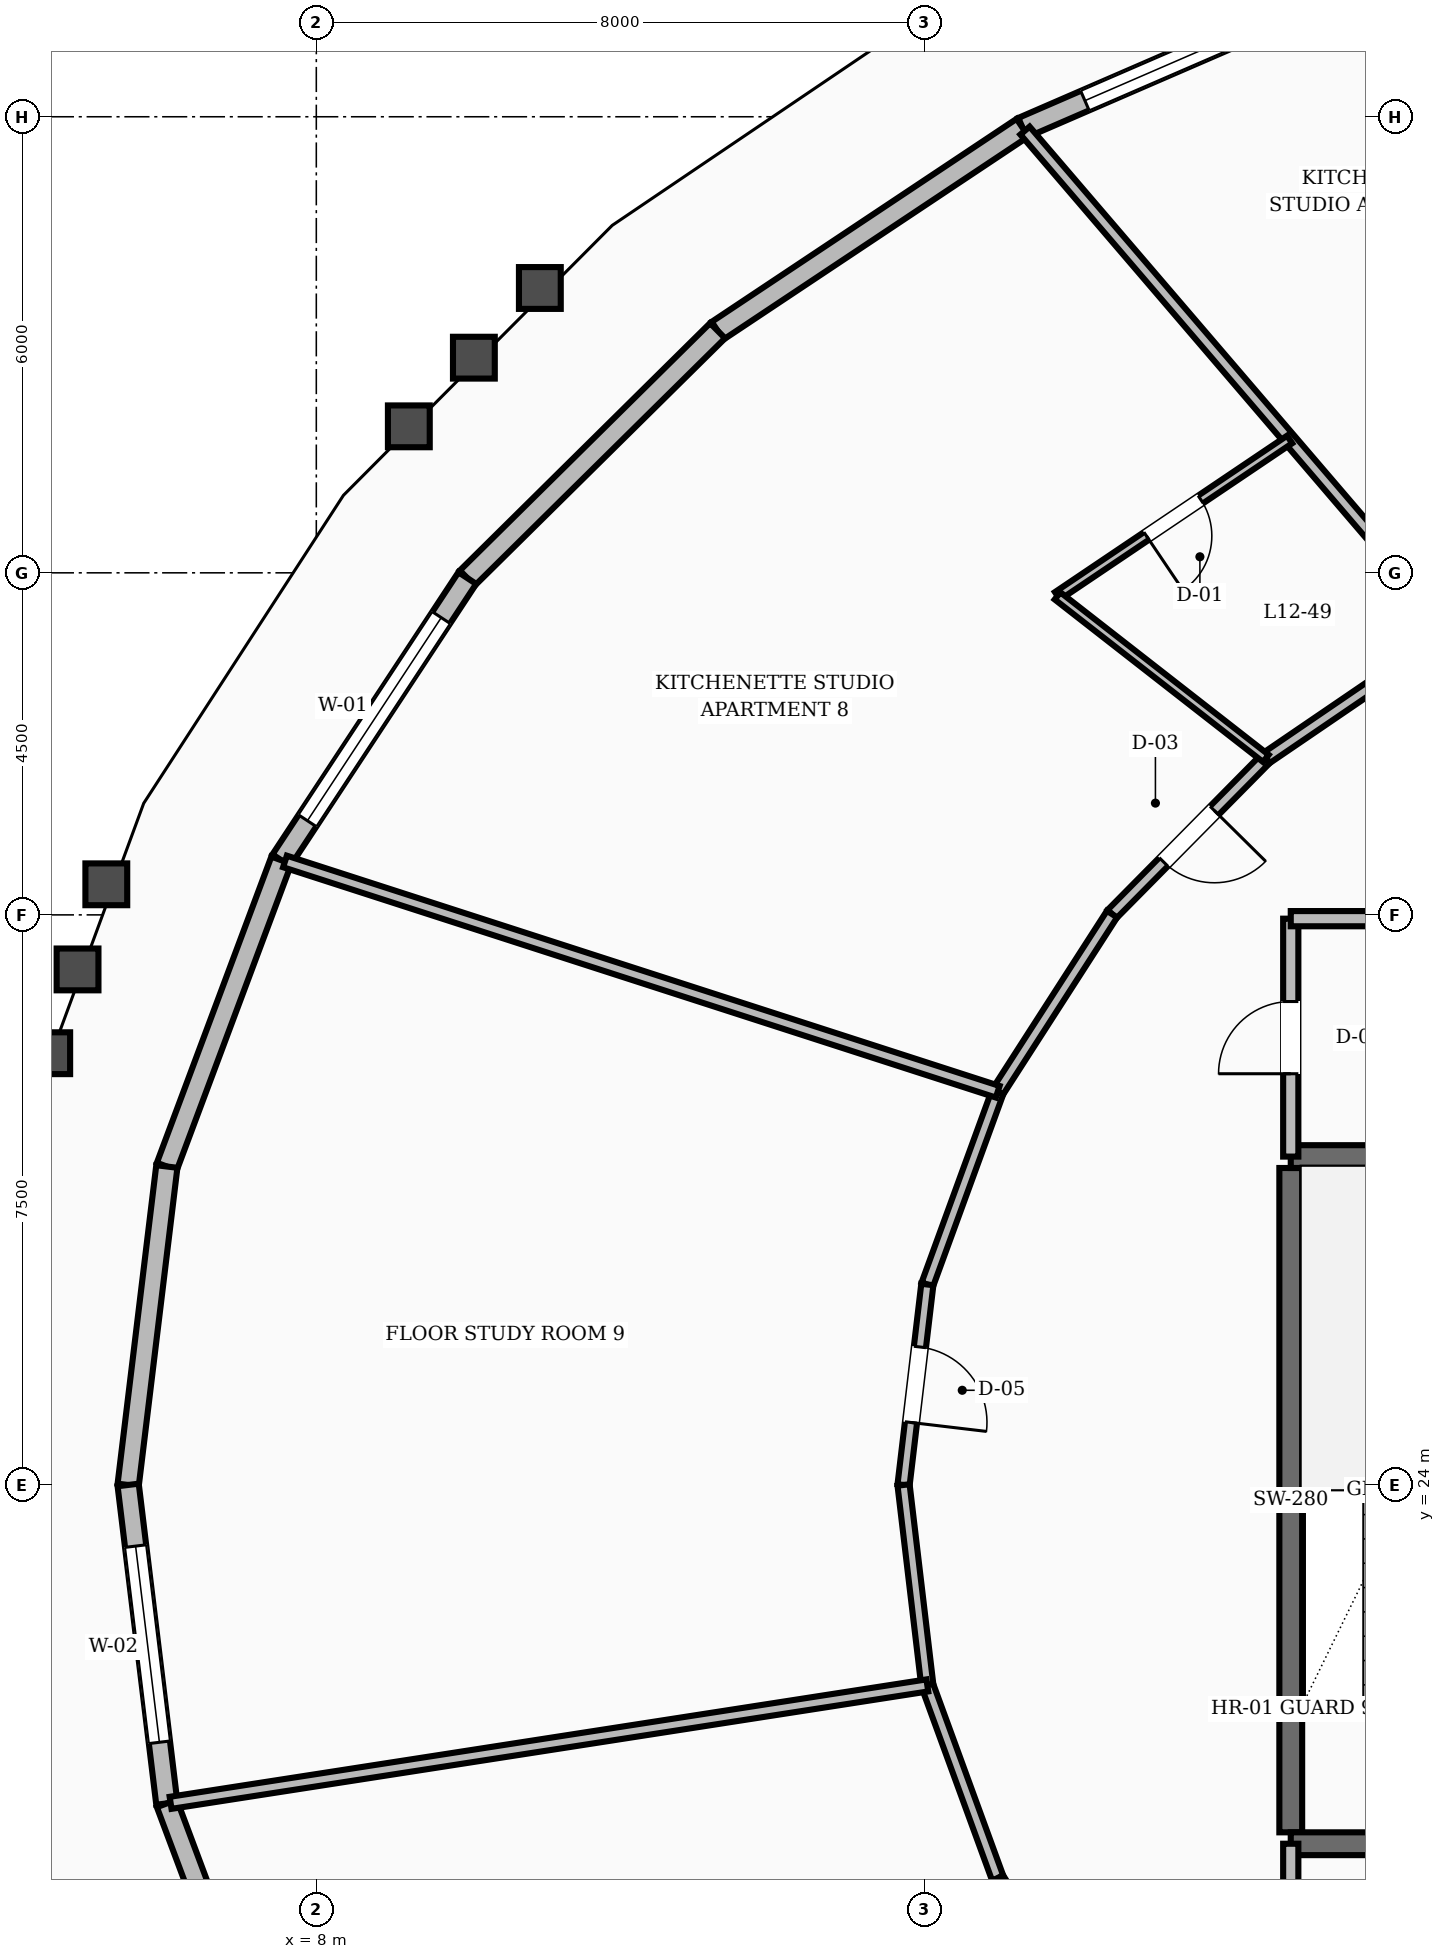
"""IFC4 building model, lengths in metres.
Left out: names, types, materials, properties, quantities, classifications, styles, units other than length and angle.
Written with IfcOpenShell. Run it as: python <this file> out.ifc"""

import sys

from ifc_helpers import new_model, si_unit, direction, frame, frame_2d, origin, place, context, subcontext, project, spatial, rectangle, extrude, element, fill, save


model = new_model("IFC4")
c1 = context("Model", 3, precision=1e-05, world=origin(), true_north=direction((0.0, 1.0)))
c2 = subcontext(c1, "Body", "Model", "MODEL_VIEW")
j1 = project(units=[si_unit("LENGTHUNIT", "METRE"), si_unit("PLANEANGLEUNIT", "RADIAN")], contexts=[c1])
p1 = place(None, origin())
s1 = spatial("IfcSite", under=j1, at=p1, CompositionType="ELEMENT")
p2 = place(p1, origin())
s2 = spatial("IfcBuilding", under=s1, at=p2, CompositionType="ELEMENT")
p3 = place(p2, frame((0.0, 0.0, 52.0)))
s3 = spatial("IfcBuildingStorey", under=s2, at=p3, CompositionType="ELEMENT", Elevation=52.0)
p4 = place(p3, frame((20.82, 19.43, 0.0), z_axis=(0.0, 0.0, 1.0), x_axis=(0.0, 1.0, 0.0)))
e1 = element("IfcWall", 1, at=p4, inside=s3, PredefinedType="SHEAR", context=c2, shape_type="SweptSolid", body=[
    extrude(rectangle(XDim=8.74, YDim=0.3, at=frame_2d((4.37, 0.0))), origin(), (0.0, 0.0, 1.0), 3.6),
])
p5 = place(p3, frame((20.82, 19.28, 0.0), z_axis=(0.0, 0.0, 1.0), x_axis=(1.0, 0.0, 0.0)))
e2 = element("IfcWall", 2, at=p5, inside=s3, PredefinedType="SHEAR", context=c2, shape_type="SweptSolid", body=[
    extrude(rectangle(XDim=3.6, YDim=0.3, at=frame_2d((1.8, 0.0))), origin(), (0.0, 0.0, 1.0), 3.6),
])
p6 = place(p5, frame((1.3, 0.0, 0.0)))
e3 = element("IfcOpeningElement", 3, at=p6, cuts=e2, PredefinedType="OPENING", context=c2, shape_type="SweptSolid", body=[
    extrude(rectangle(XDim=1.1, YDim=2.1, at=frame_2d((0.55, 1.05))), frame((0.0, 0.16, 0.0), z_axis=(0.0, -1.0, 0.0), x_axis=(1.0, 0.0, 0.0)), (0.0, 0.0, 1.0), 0.32),
])
p7 = place(p3, frame((20.82, 28.32, 0.0), z_axis=(0.0, 0.0, 1.0), x_axis=(1.0, 0.0, 0.0)))
e4 = element("IfcWall", 4, at=p7, inside=s3, PredefinedType="SHEAR", context=c2, shape_type="SweptSolid", body=[
    extrude(rectangle(XDim=3.6, YDim=0.3, at=frame_2d((1.8, 0.0))), origin(), (0.0, 0.0, 1.0), 3.6),
])
p8 = place(p3, frame((21.868, 43.841, 0.0), z_axis=(0.0, 0.0, 1.0), x_axis=(-0.917468716398, -0.397807936612, 0.0)))
e5 = element("IfcWall", 5, at=p8, inside=s3, PredefinedType="STANDARD", context=c2, shape_type="SweptSolid", body=[
    extrude(rectangle(XDim=4.989, YDim=0.28, at=frame_2d((2.494, 0.0))), origin(), (0.0, 0.0, 1.0), 2.65),
])
p9 = place(p8, frame((0.894, 0.0, 0.8)))
e6 = element("IfcOpeningElement", 6, at=p9, cuts=e5, PredefinedType="OPENING", context=c2, shape_type="SweptSolid", body=[
    extrude(rectangle(XDim=3.2, YDim=1.65, at=frame_2d((1.6, 0.825))), frame((0.0, 0.15, 0.0), z_axis=(0.0, -1.0, 0.0), x_axis=(1.0, 0.0, 0.0)), (0.0, 0.0, 1.0), 0.3),
])
p10 = place(p3, frame((17.291, 41.856, 0.0), z_axis=(0.0, 0.0, 1.0), x_axis=(-0.832431966359, -0.554127261, 0.0)))
e7 = element("IfcWall", 7, at=p10, inside=s3, PredefinedType="STANDARD", context=c2, shape_type="SweptSolid", body=[
    extrude(rectangle(XDim=4.82, YDim=0.28, at=frame_2d((2.41, 0.0))), origin(), (0.0, 0.0, 1.0), 2.65),
])
p11 = place(p3, frame((13.279, 39.185, 0.0), z_axis=(0.0, 0.0, 1.0), x_axis=(-0.711208285642, -0.702981347146, 0.0)))
e8 = element("IfcWall", 8, at=p11, inside=s3, PredefinedType="STANDARD", context=c2, shape_type="SweptSolid", body=[
    extrude(rectangle(XDim=4.629, YDim=0.28, at=frame_2d((2.315, 0.0))), origin(), (0.0, 0.0, 1.0), 2.65),
])
p12 = place(p3, frame((9.987, 35.931, 0.0), z_axis=(0.0, 0.0, 1.0), x_axis=(-0.550282912527, -0.834978272879, 0.0)))
e9 = element("IfcWall", 9, at=p12, inside=s3, PredefinedType="STANDARD", context=c2, shape_type="SweptSolid", body=[
    extrude(rectangle(XDim=4.446, YDim=0.28, at=frame_2d((2.223, 0.0))), origin(), (0.0, 0.0, 1.0), 2.65),
])
p13 = place(p12, frame((0.623, 0.0, 0.8)))
e10 = element("IfcOpeningElement", 10, at=p13, cuts=e9, PredefinedType="OPENING", context=c2, shape_type="SweptSolid", body=[
    extrude(rectangle(XDim=3.2, YDim=1.65, at=frame_2d((1.6, 0.825))), frame((0.0, 0.15, 0.0), z_axis=(0.0, -1.0, 0.0), x_axis=(1.0, 0.0, 0.0)), (0.0, 0.0, 1.0), 0.3),
])
p14 = place(p3, frame((7.54, 32.218, 0.0), z_axis=(0.0, 0.0, 1.0), x_axis=(-0.350283521278, -0.936643718135, 0.0)))
e11 = element("IfcWall", 11, at=p14, inside=s3, PredefinedType="STANDARD", context=c2, shape_type="SweptSolid", body=[
    extrude(rectangle(XDim=4.301, YDim=0.28, at=frame_2d((2.15, 0.0))), origin(), (0.0, 0.0, 1.0), 2.65),
])
p15 = place(p3, frame((6.033, 28.19, 0.0), z_axis=(0.0, 0.0, 1.0), x_axis=(-0.120495484084, -0.992713875352, 0.0)))
e12 = element("IfcWall", 12, at=p15, inside=s3, PredefinedType="STANDARD", context=c2, shape_type="SweptSolid", body=[
    extrude(rectangle(XDim=4.22, YDim=0.28, at=frame_2d((2.11, 0.0))), origin(), (0.0, 0.0, 1.0), 2.65),
])
p16 = place(p3, frame((5.525, 24.0, 0.0), z_axis=(0.0, 0.0, 1.0), x_axis=(0.120495484084, -0.992713875352, 0.0)))
e13 = element("IfcWall", 13, at=p16, inside=s3, PredefinedType="STANDARD", context=c2, shape_type="SweptSolid", body=[
    extrude(rectangle(XDim=4.22, YDim=0.28, at=frame_2d((2.11, 0.0))), origin(), (0.0, 0.0, 1.0), 2.65),
])
p17 = place(p16, frame((0.81, 0.0, 0.8)))
e14 = element("IfcOpeningElement", 14, at=p17, cuts=e13, PredefinedType="OPENING", context=c2, shape_type="SweptSolid", body=[
    extrude(rectangle(XDim=2.6, YDim=1.65, at=frame_2d((1.3, 0.825))), frame((0.0, 0.15, 0.0), z_axis=(0.0, -1.0, 0.0), x_axis=(1.0, 0.0, 0.0)), (0.0, 0.0, 1.0), 0.3),
])
p18 = place(p3, frame((6.033, 19.81, 0.0), z_axis=(0.0, 0.0, 1.0), x_axis=(0.350283521278, -0.936643718135, 0.0)))
e15 = element("IfcWall", 15, at=p18, inside=s3, PredefinedType="STANDARD", context=c2, shape_type="SweptSolid", body=[
    extrude(rectangle(XDim=4.301, YDim=0.28, at=frame_2d((2.15, 0.0))), origin(), (0.0, 0.0, 1.0), 2.65),
])
p19 = place(p3, frame((20.82, 16.55, 0.0), z_axis=(0.0, 0.0, 1.0), x_axis=(0.0, 1.0, 0.0)))
e16 = element("IfcWall", 16, at=p19, inside=s3, PredefinedType="SOLIDWALL", context=c2, shape_type="SweptSolid", body=[
    extrude(rectangle(XDim=2.73, YDim=0.2, at=frame_2d((1.365, 0.0))), origin(), (0.0, 0.0, 1.0), 2.61),
])
p20 = place(p19, frame((0.815, 0.0, 0.0)))
e17 = element("IfcOpeningElement", 17, at=p20, cuts=e16, PredefinedType="OPENING", context=c2, shape_type="SweptSolid", body=[
    extrude(rectangle(XDim=1.1, YDim=2.1, at=frame_2d((0.55, 1.05))), frame((0.0, 0.11, 0.0), z_axis=(0.0, -1.0, 0.0), x_axis=(1.0, 0.0, 0.0)), (0.0, 0.0, 1.0), 0.22),
])
p21 = place(p3, frame((20.82, 28.32, 0.0), z_axis=(0.0, 0.0, 1.0), x_axis=(0.0, 1.0, 0.0)))
e18 = element("IfcWall", 18, at=p21, inside=s3, PredefinedType="SOLIDWALL", context=c2, shape_type="SweptSolid", body=[
    extrude(rectangle(XDim=3.13, YDim=0.2, at=frame_2d((1.565, 0.0))), origin(), (0.0, 0.0, 1.0), 2.61),
])
p22 = place(p21, frame((1.09, 0.0, 0.0)))
e19 = element("IfcOpeningElement", 19, at=p22, cuts=e18, PredefinedType="OPENING", context=c2, shape_type="SweptSolid", body=[
    extrude(rectangle(XDim=0.95, YDim=2.1, at=frame_2d((0.475, 1.05))), frame((0.0, 0.11, 0.0), z_axis=(0.0, -1.0, 0.0), x_axis=(1.0, 0.0, 0.0)), (0.0, 0.0, 1.0), 0.22),
])
p23 = place(p3, frame((20.82, 31.45, 0.0), z_axis=(0.0, 0.0, 1.0), x_axis=(1.0, 0.0, 0.0)))
e20 = element("IfcWall", 20, at=p23, inside=s3, PredefinedType="SOLIDWALL", context=c2, shape_type="SweptSolid", body=[
    extrude(rectangle(XDim=3.98, YDim=0.2, at=frame_2d((1.99, 0.0))), origin(), (0.0, 0.0, 1.0), 2.61),
])
p24 = place(p3, frame((22.959, 35.24, 0.0), z_axis=(0.0, 0.0, 1.0), x_axis=(-0.826293096206, -0.56324037423, 0.0)))
e21 = element("IfcWall", 21, at=p24, inside=s3, PredefinedType="SOLIDWALL", context=c2, shape_type="SweptSolid", body=[
    extrude(rectangle(XDim=2.985, YDim=0.16, at=frame_2d((1.492, 0.0))), origin(), (0.0, 0.0, 1.0), 2.61),
])
p25 = place(p3, frame((20.492, 33.559, 0.0), z_axis=(0.0, 0.0, 1.0), x_axis=(-0.702811997, -0.711375636969, 0.0)))
e22 = element("IfcWall", 22, at=p25, inside=s3, PredefinedType="SOLIDWALL", context=c2, shape_type="SweptSolid", body=[
    extrude(rectangle(XDim=2.879, YDim=0.16, at=frame_2d((1.44, 0.0))), origin(), (0.0, 0.0, 1.0), 2.61),
])
p26 = place(p25, frame((0.965, 0.0, 0.0)))
e23 = element("IfcOpeningElement", 23, at=p26, cuts=e22, PredefinedType="OPENING", context=c2, shape_type="SweptSolid", body=[
    extrude(rectangle(XDim=0.95, YDim=2.1, at=frame_2d((0.475, 1.05))), frame((0.0, 0.09, 0.0), z_axis=(0.0, -1.0, 0.0), x_axis=(1.0, 0.0, 0.0)), (0.0, 0.0, 1.0), 0.18),
])
p27 = place(p3, frame((18.469, 31.51, 0.0), z_axis=(0.0, 0.0, 1.0), x_axis=(-0.541126045017, -0.840941498206, 0.0)))
e24 = element("IfcWall", 24, at=p27, inside=s3, PredefinedType="SOLIDWALL", context=c2, shape_type="SweptSolid", body=[
    extrude(rectangle(XDim=2.779, YDim=0.16, at=frame_2d((1.39, 0.0))), origin(), (0.0, 0.0, 1.0), 2.61),
])
p28 = place(p3, frame((16.965, 29.173, 0.0), z_axis=(0.0, 0.0, 1.0), x_axis=(-0.343013437329, -0.939330496583, 0.0)))
e25 = element("IfcWall", 25, at=p28, inside=s3, PredefinedType="SOLIDWALL", context=c2, shape_type="SweptSolid", body=[
    extrude(rectangle(XDim=2.7, YDim=0.16, at=frame_2d((1.35, 0.0))), origin(), (0.0, 0.0, 1.0), 2.61),
])
p29 = place(p3, frame((16.039, 26.637, 0.0), z_axis=(0.0, 0.0, 1.0), x_axis=(-0.117763961213, -0.99304161516, 0.0)))
e26 = element("IfcWall", 26, at=p29, inside=s3, PredefinedType="SOLIDWALL", context=c2, shape_type="SweptSolid", body=[
    extrude(rectangle(XDim=2.656, YDim=0.16, at=frame_2d((1.328, 0.0))), origin(), (0.0, 0.0, 1.0), 2.61),
])
p30 = place(p29, frame((0.828, 0.0, 0.0)))
e27 = element("IfcOpeningElement", 27, at=p30, cuts=e26, PredefinedType="OPENING", context=c2, shape_type="SweptSolid", body=[
    extrude(rectangle(XDim=1.0, YDim=2.1, at=frame_2d((0.5, 1.05))), frame((0.0, 0.09, 0.0), z_axis=(0.0, -1.0, 0.0), x_axis=(1.0, 0.0, 0.0)), (0.0, 0.0, 1.0), 0.18),
])
p31 = place(p3, frame((15.726, 24.0, 0.0), z_axis=(0.0, 0.0, 1.0), x_axis=(0.117763961213, -0.99304161516, 0.0)))
e28 = element("IfcWall", 28, at=p31, inside=s3, PredefinedType="SOLIDWALL", context=c2, shape_type="SweptSolid", body=[
    extrude(rectangle(XDim=2.656, YDim=0.16, at=frame_2d((1.328, 0.0))), origin(), (0.0, 0.0, 1.0), 2.61),
])
p32 = place(p3, frame((16.039, 21.363, 0.0), z_axis=(0.0, 0.0, 1.0), x_axis=(0.343013437329, -0.939330496583, 0.0)))
e29 = element("IfcWall", 29, at=p32, inside=s3, PredefinedType="SOLIDWALL", context=c2, shape_type="SweptSolid", body=[
    extrude(rectangle(XDim=2.7, YDim=0.16, at=frame_2d((1.35, 0.0))), origin(), (0.0, 0.0, 1.0), 2.61),
])
p33 = place(p3, frame((16.965, 18.827, 0.0), z_axis=(0.0, 0.0, 1.0), x_axis=(0.541126045017, -0.840941498206, 0.0)))
e30 = element("IfcWall", 30, at=p33, inside=s3, PredefinedType="SOLIDWALL", context=c2, shape_type="SweptSolid", body=[
    extrude(rectangle(XDim=2.779, YDim=0.16, at=frame_2d((1.39, 0.0))), origin(), (0.0, 0.0, 1.0), 2.61),
])
p34 = place(p33, frame((0.89, 0.0, 0.0)))
e31 = element("IfcOpeningElement", 31, at=p34, cuts=e30, PredefinedType="OPENING", context=c2, shape_type="SweptSolid", body=[
    extrude(rectangle(XDim=1.0, YDim=2.1, at=frame_2d((0.5, 1.05))), frame((0.0, 0.09, 0.0), z_axis=(0.0, -1.0, 0.0), x_axis=(1.0, 0.0, 0.0)), (0.0, 0.0, 1.0), 0.18),
])
p35 = place(p3, frame((22.959, 35.24, 0.0), z_axis=(0.0, 0.0, 1.0), x_axis=(-0.650552260828, 0.75946149075, 0.0)))
e32 = element("IfcWall", 32, at=p35, inside=s3, PredefinedType="SOLIDWALL", context=c2, shape_type="SweptSolid", body=[
    extrude(rectangle(XDim=8.662, YDim=0.16, at=frame_2d((4.331, 0.0))), origin(), (0.0, 0.0, 1.0), 2.61),
])
p36 = place(p3, frame((20.805, 37.754, 0.0), z_axis=(0.0, 0.0, 1.0), x_axis=(-0.829367953904, -0.558702780588, 0.0)))
e33 = element("IfcWall", 33, at=p36, inside=s3, PredefinedType="PARTITIONING", context=c2, shape_type="SweptSolid", body=[
    extrude(rectangle(XDim=3.682, YDim=0.12, at=frame_2d((1.841, 0.0))), origin(), (0.0, 0.0, 1.0), 2.61),
])
p37 = place(p36, frame((1.411, 0.0, 0.0)))
e34 = element("IfcOpeningElement", 34, at=p37, cuts=e33, PredefinedType="OPENING", context=c2, shape_type="SweptSolid", body=[
    extrude(rectangle(XDim=0.86, YDim=2.1, at=frame_2d((0.43, 1.05))), frame((0.0, 0.07, 0.0), z_axis=(0.0, -1.0, 0.0), x_axis=(1.0, 0.0, 0.0)), (0.0, 0.0, 1.0), 0.14),
])
p38 = place(p3, frame((20.492, 33.559, 0.0), z_axis=(0.0, 0.0, 1.0), x_axis=(-0.788470290208, 0.615072842401, 0.0)))
e35 = element("IfcWall", 35, at=p38, inside=s3, PredefinedType="PARTITIONING", context=c2, shape_type="SweptSolid", body=[
    extrude(rectangle(XDim=3.476, YDim=0.12, at=frame_2d((1.738, 0.0))), origin(), (0.0, 0.0, 1.0), 2.61),
])
p39 = place(p3, frame((16.965, 29.173, 0.0), z_axis=(0.0, 0.0, 1.0), x_axis=(-0.951563741072, 0.307451535492, 0.0)))
e36 = element("IfcWall", 36, at=p39, inside=s3, PredefinedType="SOLIDWALL", context=c2, shape_type="SweptSolid", body=[
    extrude(rectangle(XDim=9.854, YDim=0.16, at=frame_2d((4.927, 0.0))), origin(), (0.0, 0.0, 1.0), 2.61),
])
p40 = place(p3, frame((16.039, 21.363, 0.0), z_axis=(0.0, 0.0, 1.0), x_axis=(-0.988176752001, -0.153318970792, 0.0)))
e37 = element("IfcWall", 37, at=p40, inside=s3, PredefinedType="SOLIDWALL", context=c2, shape_type="SweptSolid", body=[
    extrude(rectangle(XDim=10.075, YDim=0.16, at=frame_2d((5.038, 0.0))), origin(), (0.0, 0.0, 1.0), 2.61),
])
p41 = place(p9, origin())
e38 = element("IfcWindow", 38, at=p41, inside=s3, PartitioningType="SINGLE_PANEL", PredefinedType="WINDOW", context=c2, shape_type="SweptSolid", body=[
    extrude(rectangle(XDim=3.2, YDim=1.65, at=frame_2d((1.6, 0.825))), frame((0.0, 0.03, 0.0), z_axis=(0.0, -1.0, 0.0), x_axis=(1.0, 0.0, 0.0)), (0.0, 0.0, 1.0), 0.06),
])
fill(e6, e38)
p42 = place(p13, origin())
e39 = element("IfcWindow", 39, at=p42, inside=s3, PartitioningType="SINGLE_PANEL", PredefinedType="WINDOW", context=c2, shape_type="SweptSolid", body=[
    extrude(rectangle(XDim=3.2, YDim=1.65, at=frame_2d((1.6, 0.825))), frame((0.0, 0.03, 0.0), z_axis=(0.0, -1.0, 0.0), x_axis=(1.0, 0.0, 0.0)), (0.0, 0.0, 1.0), 0.06),
])
fill(e10, e39)
p43 = place(p17, origin())
e40 = element("IfcWindow", 40, at=p43, inside=s3, PartitioningType="SINGLE_PANEL", PredefinedType="WINDOW", context=c2, shape_type="SweptSolid", body=[
    extrude(rectangle(XDim=2.6, YDim=1.65, at=frame_2d((1.3, 0.825))), frame((0.0, 0.03, 0.0), z_axis=(0.0, -1.0, 0.0), x_axis=(1.0, 0.0, 0.0)), (0.0, 0.0, 1.0), 0.06),
])
fill(e14, e40)
p44 = place(p22, origin())
e41 = element("IfcDoor", 41, at=p44, inside=s3, OperationType="SINGLE_SWING_LEFT", PredefinedType="DOOR", context=c2, shape_type="SweptSolid", body=[
    extrude(rectangle(XDim=0.95, YDim=2.1, at=frame_2d((0.475, 1.05))), frame((0.0, 0.025, 0.0), z_axis=(0.0, -1.0, 0.0), x_axis=(1.0, 0.0, 0.0)), (0.0, 0.0, 1.0), 0.05),
])
fill(e19, e41)
p45 = place(p37, origin())
e42 = element("IfcDoor", 42, at=p45, inside=s3, OperationType="SINGLE_SWING_RIGHT", PredefinedType="DOOR", context=c2, shape_type="SweptSolid", body=[
    extrude(rectangle(XDim=0.86, YDim=2.1, at=frame_2d((0.43, 1.05))), frame((0.0, 0.025, 0.0), z_axis=(0.0, -1.0, 0.0), x_axis=(1.0, 0.0, 0.0)), (0.0, 0.0, 1.0), 0.05),
])
fill(e34, e42)
p46 = place(p26, origin())
e43 = element("IfcDoor", 43, at=p46, inside=s3, OperationType="SINGLE_SWING_LEFT", PredefinedType="DOOR", context=c2, shape_type="SweptSolid", body=[
    extrude(rectangle(XDim=0.95, YDim=2.1, at=frame_2d((0.475, 1.05))), frame((0.0, 0.025, 0.0), z_axis=(0.0, -1.0, 0.0), x_axis=(1.0, 0.0, 0.0)), (0.0, 0.0, 1.0), 0.05),
])
fill(e23, e43)
p47 = place(p30, origin())
e44 = element("IfcDoor", 44, at=p47, inside=s3, OperationType="SINGLE_SWING_RIGHT", PredefinedType="DOOR", context=c2, shape_type="SweptSolid", body=[
    extrude(rectangle(XDim=1.0, YDim=2.1, at=frame_2d((0.5, 1.05))), frame((0.0, 0.025, 0.0), z_axis=(0.0, -1.0, 0.0), x_axis=(1.0, 0.0, 0.0)), (0.0, 0.0, 1.0), 0.05),
])
fill(e27, e44)
save(model, sys.argv[1])
